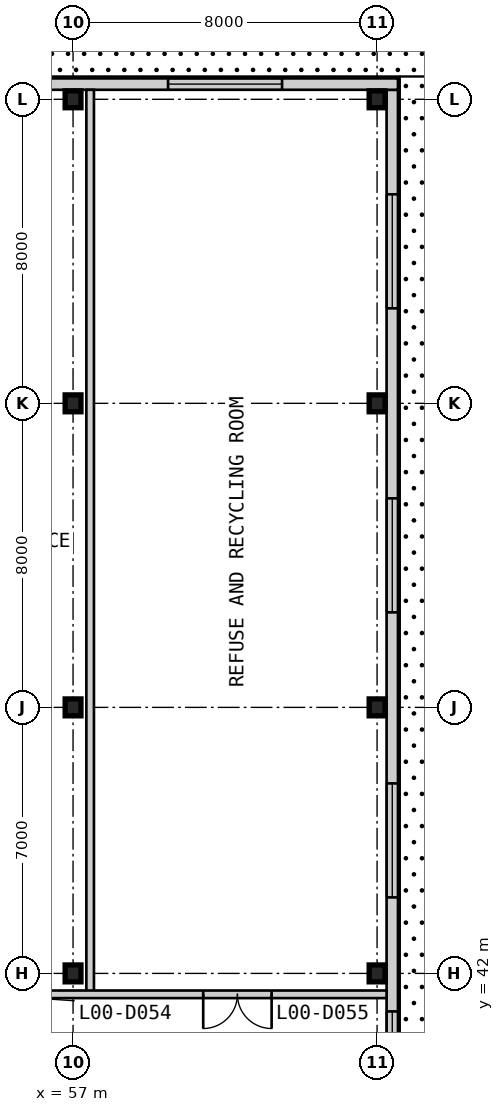
"""IFC4 building model, lengths in metres.
Left out: names, types, materials, properties, quantities, classifications, styles, units other than length and angle.
Written with IfcOpenShell. Run it as: python <this file> out.ifc"""

import sys

from ifc_helpers import new_model, si_unit, direction, frame, frame_2d, origin, origin_2d, place, context, subcontext, project, spatial, rectangle, i_section, extrude, element, fill, save


model = new_model("IFC4")
c1 = context("Model", 3, precision=1e-05, world=origin(), true_north=direction((0.0, 1.0)))
c2 = subcontext(c1, "Body", "Model", "MODEL_VIEW")
j1 = project(units=[si_unit("LENGTHUNIT", "METRE"), si_unit("PLANEANGLEUNIT", "RADIAN")], contexts=[c1])
p1 = place(None, origin())
s1 = spatial("IfcSite", under=j1, at=p1, CompositionType="ELEMENT")
p2 = place(p1, origin())
s2 = spatial("IfcBuilding", under=s1, at=p2, CompositionType="ELEMENT")
p3 = place(p2, origin())
s3 = spatial("IfcBuildingStorey", under=s2, at=p3, CompositionType="ELEMENT", Elevation=0.0)
for number, where, z_axis, x_axis in (
    (1, (57.0, 42.0, 0.0), (0.0, 0.0, 1.0), (1.0, 0.0, 0.0)),
    (2, (57.0, 49.0, 0.0), (0.0, 0.0, 1.0), (1.0, 0.0, 0.0)),
    (3, (57.0, 57.0, 0.0), (0.0, 0.0, 1.0), (1.0, 0.0, 0.0)),
):
    element("IfcColumn", number, at=place(p3, frame(where, z_axis=z_axis, x_axis=x_axis)), inside=s3, PredefinedType="COLUMN", context=c2, shape_type="SweptSolid", body=[
        extrude(i_section(OverallWidth=0.417, OverallDepth=0.445, WebThickness=0.039, FlangeThickness=0.063, at=origin_2d()), origin(), (0.0, 0.0, 1.0), 7.0),
    ])
for number, where, z_axis, x_axis in (
    (4, (57.0, 65.0, -0.3), (0.0, 0.0, 1.0), (1.0, 0.0, 0.0)),
    (5, (65.0, 42.0, -0.3), (0.0, 0.0, 1.0), (1.0, 0.0, 0.0)),
    (6, (65.0, 49.0, -0.3), (0.0, 0.0, 1.0), (1.0, 0.0, 0.0)),
    (7, (65.0, 57.0, -0.3), (0.0, 0.0, 1.0), (1.0, 0.0, 0.0)),
    (8, (65.0, 65.0, -0.3), (0.0, 0.0, 1.0), (1.0, 0.0, 0.0)),
):
    element("IfcColumn", number, at=place(p3, frame(where, z_axis=z_axis, x_axis=x_axis)), inside=s3, PredefinedType="COLUMN", context=c2, shape_type="SweptSolid", body=[
        extrude(i_section(OverallWidth=0.417, OverallDepth=0.445, WebThickness=0.039, FlangeThickness=0.063, at=origin_2d()), origin(), (0.0, 0.0, 1.0), 7.3),
    ])
p4 = place(p3, frame((65.4, -15.25, 0.0), z_axis=(0.0, 0.0, 1.0), x_axis=(0.0, 1.0, 0.0)))
e9 = element("IfcWall", 9, at=p4, inside=s3, PredefinedType="SOLIDWALL", context=c2, shape_type="SweptSolid", body=[
    extrude(rectangle(XDim=80.5, YDim=0.3, at=frame_2d((40.25, 0.0))), origin(), (0.0, 0.0, 1.0), 6.7),
])
p5 = place(p4, frame((33.35, 0.0, 0.0)))
e10 = element("IfcOpeningElement", 10, at=p5, cuts=e9, PredefinedType="OPENING", context=c2, shape_type="SweptSolid", body=[
    extrude(rectangle(XDim=1.8, YDim=2.4, at=frame_2d((0.9, 1.2))), frame((0.0, 0.16, 0.0), z_axis=(0.0, -1.0, 0.0), x_axis=(1.0, 0.0, 0.0)), (0.0, 0.0, 1.0), 0.32),
])
p6 = place(p4, frame((45.35, 0.0, 0.0)))
e11 = element("IfcOpeningElement", 11, at=p6, cuts=e9, PredefinedType="OPENING", context=c2, shape_type="SweptSolid", body=[
    extrude(rectangle(XDim=1.8, YDim=2.4, at=frame_2d((0.9, 1.2))), frame((0.0, 0.16, 0.0), z_axis=(0.0, -1.0, 0.0), x_axis=(1.0, 0.0, 0.0)), (0.0, 0.0, 1.0), 0.32),
])
p7 = place(p4, frame((2.75, 0.0, 0.9)))
e12 = element("IfcOpeningElement", 12, at=p7, cuts=e9, PredefinedType="OPENING", context=c2, shape_type="SweptSolid", body=[
    extrude(rectangle(XDim=3.0, YDim=2.4, at=frame_2d((1.5, 1.2))), frame((0.0, 0.16, 0.0), z_axis=(0.0, -1.0, 0.0), x_axis=(1.0, 0.0, 0.0)), (0.0, 0.0, 1.0), 0.32),
])
p8 = place(p4, frame((10.75, 0.0, 0.9)))
e13 = element("IfcOpeningElement", 13, at=p8, cuts=e9, PredefinedType="OPENING", context=c2, shape_type="SweptSolid", body=[
    extrude(rectangle(XDim=3.0, YDim=2.4, at=frame_2d((1.5, 1.2))), frame((0.0, 0.16, 0.0), z_axis=(0.0, -1.0, 0.0), x_axis=(1.0, 0.0, 0.0)), (0.0, 0.0, 1.0), 0.32),
])
p9 = place(p4, frame((18.75, 0.0, 0.9)))
e14 = element("IfcOpeningElement", 14, at=p9, cuts=e9, PredefinedType="OPENING", context=c2, shape_type="SweptSolid", body=[
    extrude(rectangle(XDim=3.0, YDim=2.4, at=frame_2d((1.5, 1.2))), frame((0.0, 0.16, 0.0), z_axis=(0.0, -1.0, 0.0), x_axis=(1.0, 0.0, 0.0)), (0.0, 0.0, 1.0), 0.32),
])
p10 = place(p4, frame((53.25, 0.0, 0.9)))
e15 = element("IfcOpeningElement", 15, at=p10, cuts=e9, PredefinedType="OPENING", context=c2, shape_type="SweptSolid", body=[
    extrude(rectangle(XDim=3.0, YDim=2.4, at=frame_2d((1.5, 1.2))), frame((0.0, 0.16, 0.0), z_axis=(0.0, -1.0, 0.0), x_axis=(1.0, 0.0, 0.0)), (0.0, 0.0, 1.0), 0.32),
])
p11 = place(p4, frame((59.25, 0.0, 0.9)))
e16 = element("IfcOpeningElement", 16, at=p11, cuts=e9, PredefinedType="OPENING", context=c2, shape_type="SweptSolid", body=[
    extrude(rectangle(XDim=3.0, YDim=2.4, at=frame_2d((1.5, 1.2))), frame((0.0, 0.16, 0.0), z_axis=(0.0, -1.0, 0.0), x_axis=(1.0, 0.0, 0.0)), (0.0, 0.0, 1.0), 0.32),
])
p12 = place(p4, frame((66.75, 0.0, 0.9)))
e17 = element("IfcOpeningElement", 17, at=p12, cuts=e9, PredefinedType="OPENING", context=c2, shape_type="SweptSolid", body=[
    extrude(rectangle(XDim=3.0, YDim=2.4, at=frame_2d((1.5, 1.2))), frame((0.0, 0.16, 0.0), z_axis=(0.0, -1.0, 0.0), x_axis=(1.0, 0.0, 0.0)), (0.0, 0.0, 1.0), 0.32),
])
p13 = place(p4, frame((74.75, 0.0, 0.9)))
e18 = element("IfcOpeningElement", 18, at=p13, cuts=e9, PredefinedType="OPENING", context=c2, shape_type="SweptSolid", body=[
    extrude(rectangle(XDim=3.0, YDim=2.4, at=frame_2d((1.5, 1.2))), frame((0.0, 0.16, 0.0), z_axis=(0.0, -1.0, 0.0), x_axis=(1.0, 0.0, 0.0)), (0.0, 0.0, 1.0), 0.32),
])
p14 = place(p3, frame((65.55, 65.4, 0.0), z_axis=(0.0, 0.0, 1.0), x_axis=(-1.0, 0.0, 0.0)))
e19 = element("IfcWall", 19, at=p14, inside=s3, PredefinedType="SOLIDWALL", context=c2, shape_type="SweptSolid", body=[
    extrude(rectangle(XDim=81.1, YDim=0.3, at=frame_2d((40.55, 0.0))), origin(), (0.0, 0.0, 1.0), 6.7),
])
p15 = place(p14, frame((37.65, 0.0, 0.0)))
e20 = element("IfcOpeningElement", 20, at=p15, cuts=e19, PredefinedType="OPENING", context=c2, shape_type="SweptSolid", body=[
    extrude(rectangle(XDim=1.8, YDim=2.4, at=frame_2d((0.9, 1.2))), frame((0.0, 0.16, 0.0), z_axis=(0.0, -1.0, 0.0), x_axis=(1.0, 0.0, 0.0)), (0.0, 0.0, 1.0), 0.32),
])
p16 = place(p14, frame((33.65, 0.0, 0.0)))
e21 = element("IfcOpeningElement", 21, at=p16, cuts=e19, PredefinedType="OPENING", context=c2, shape_type="SweptSolid", body=[
    extrude(rectangle(XDim=1.8, YDim=2.4, at=frame_2d((0.9, 1.2))), frame((0.0, 0.16, 0.0), z_axis=(0.0, -1.0, 0.0), x_axis=(1.0, 0.0, 0.0)), (0.0, 0.0, 1.0), 0.32),
])
p17 = place(p14, frame((18.25, 0.0, 0.0)))
e22 = element("IfcOpeningElement", 22, at=p17, cuts=e19, PredefinedType="OPENING", context=c2, shape_type="SweptSolid", body=[
    extrude(rectangle(XDim=3.6, YDim=4.5, at=frame_2d((1.8, 2.25))), frame((0.0, 0.16, 0.0), z_axis=(0.0, -1.0, 0.0), x_axis=(1.0, 0.0, 0.0)), (0.0, 0.0, 1.0), 0.32),
])
p18 = place(p14, frame((75.05, 0.0, 0.9)))
e23 = element("IfcOpeningElement", 23, at=p18, cuts=e19, PredefinedType="OPENING", context=c2, shape_type="SweptSolid", body=[
    extrude(rectangle(XDim=3.0, YDim=2.4, at=frame_2d((1.5, 1.2))), frame((0.0, 0.16, 0.0), z_axis=(0.0, -1.0, 0.0), x_axis=(1.0, 0.0, 0.0)), (0.0, 0.0, 1.0), 0.32),
])
p19 = place(p14, frame((67.05, 0.0, 0.9)))
e24 = element("IfcOpeningElement", 24, at=p19, cuts=e19, PredefinedType="OPENING", context=c2, shape_type="SweptSolid", body=[
    extrude(rectangle(XDim=3.0, YDim=2.4, at=frame_2d((1.5, 1.2))), frame((0.0, 0.16, 0.0), z_axis=(0.0, -1.0, 0.0), x_axis=(1.0, 0.0, 0.0)), (0.0, 0.0, 1.0), 0.32),
])
p20 = place(p14, frame((59.05, 0.0, 0.9)))
e25 = element("IfcOpeningElement", 25, at=p20, cuts=e19, PredefinedType="OPENING", context=c2, shape_type="SweptSolid", body=[
    extrude(rectangle(XDim=3.0, YDim=2.4, at=frame_2d((1.5, 1.2))), frame((0.0, 0.16, 0.0), z_axis=(0.0, -1.0, 0.0), x_axis=(1.0, 0.0, 0.0)), (0.0, 0.0, 1.0), 0.32),
])
p21 = place(p14, frame((45.05, 0.0, 0.9)))
e26 = element("IfcOpeningElement", 26, at=p21, cuts=e19, PredefinedType="OPENING", context=c2, shape_type="SweptSolid", body=[
    extrude(rectangle(XDim=3.0, YDim=2.4, at=frame_2d((1.5, 1.2))), frame((0.0, 0.16, 0.0), z_axis=(0.0, -1.0, 0.0), x_axis=(1.0, 0.0, 0.0)), (0.0, 0.0, 1.0), 0.32),
])
p22 = place(p14, frame((24.55, 0.0, 0.9)))
e27 = element("IfcOpeningElement", 27, at=p22, cuts=e19, PredefinedType="OPENING", context=c2, shape_type="SweptSolid", body=[
    extrude(rectangle(XDim=3.0, YDim=2.4, at=frame_2d((1.5, 1.2))), frame((0.0, 0.16, 0.0), z_axis=(0.0, -1.0, 0.0), x_axis=(1.0, 0.0, 0.0)), (0.0, 0.0, 1.0), 0.32),
])
p23 = place(p14, frame((11.05, 0.0, 0.9)))
e28 = element("IfcOpeningElement", 28, at=p23, cuts=e19, PredefinedType="OPENING", context=c2, shape_type="SweptSolid", body=[
    extrude(rectangle(XDim=3.0, YDim=2.4, at=frame_2d((1.5, 1.2))), frame((0.0, 0.16, 0.0), z_axis=(0.0, -1.0, 0.0), x_axis=(1.0, 0.0, 0.0)), (0.0, 0.0, 1.0), 0.32),
])
p24 = place(p14, frame((3.05, 0.0, 0.9)))
e29 = element("IfcOpeningElement", 29, at=p24, cuts=e19, PredefinedType="OPENING", context=c2, shape_type="SweptSolid", body=[
    extrude(rectangle(XDim=3.0, YDim=2.4, at=frame_2d((1.5, 1.2))), frame((0.0, 0.16, 0.0), z_axis=(0.0, -1.0, 0.0), x_axis=(1.0, 0.0, 0.0)), (0.0, 0.0, 1.0), 0.32),
])
p25 = place(p3, frame((57.45, 41.45, 0.0), z_axis=(0.0, 0.0, 1.0), x_axis=(0.0, 1.0, 0.0)))
e30 = element("IfcWall", 30, at=p25, inside=s3, PredefinedType="PARTITIONING", context=c2, shape_type="SweptSolid", body=[
    extrude(rectangle(XDim=23.8, YDim=0.2, at=frame_2d((11.9, 0.0))), origin(), (0.0, 0.0, 1.0), 6.7),
])
p26 = place(p3, frame((50.6, 41.45, 0.0), z_axis=(0.0, 0.0, 1.0), x_axis=(1.0, 0.0, 0.0)))
e31 = element("IfcWall", 31, at=p26, inside=s3, PredefinedType="PARTITIONING", context=c2, shape_type="SweptSolid", body=[
    extrude(rectangle(XDim=14.65, YDim=0.2, at=frame_2d((7.325, 0.0))), origin(), (0.0, 0.0, 1.0), 6.7),
])
p27 = place(p26, frame((2.55, 0.0, 0.0)))
e32 = element("IfcOpeningElement", 32, at=p27, cuts=e31, PredefinedType="OPENING", context=c2, shape_type="SweptSolid", body=[
    extrude(rectangle(XDim=1.8, YDim=2.4, at=frame_2d((0.9, 1.2))), frame((0.0, 0.11, 0.0), z_axis=(0.0, -1.0, 0.0), x_axis=(1.0, 0.0, 0.0)), (0.0, 0.0, 1.0), 0.22),
])
p28 = place(p26, frame((9.825, 0.0, 0.0)))
e33 = element("IfcOpeningElement", 33, at=p28, cuts=e31, PredefinedType="OPENING", context=c2, shape_type="SweptSolid", body=[
    extrude(rectangle(XDim=1.8, YDim=2.4, at=frame_2d((0.9, 1.2))), frame((0.0, 0.11, 0.0), z_axis=(0.0, -1.0, 0.0), x_axis=(1.0, 0.0, 0.0)), (0.0, 0.0, 1.0), 0.22),
])
p29 = place(p10, origin())
e34 = element("IfcWindow", 34, at=p29, inside=s3, PartitioningType="SINGLE_PANEL", PredefinedType="WINDOW", context=c2, shape_type="SweptSolid", body=[
    extrude(rectangle(XDim=3.0, YDim=2.4, at=frame_2d((1.5, 1.2))), frame((0.0, 0.03, 0.0), z_axis=(0.0, -1.0, 0.0), x_axis=(1.0, 0.0, 0.0)), (0.0, 0.0, 1.0), 0.06),
])
fill(e15, e34)
p30 = place(p11, origin())
e35 = element("IfcWindow", 35, at=p30, inside=s3, PartitioningType="SINGLE_PANEL", PredefinedType="WINDOW", context=c2, shape_type="SweptSolid", body=[
    extrude(rectangle(XDim=3.0, YDim=2.4, at=frame_2d((1.5, 1.2))), frame((0.0, 0.03, 0.0), z_axis=(0.0, -1.0, 0.0), x_axis=(1.0, 0.0, 0.0)), (0.0, 0.0, 1.0), 0.06),
])
fill(e16, e35)
p31 = place(p12, origin())
e36 = element("IfcWindow", 36, at=p31, inside=s3, PartitioningType="SINGLE_PANEL", PredefinedType="WINDOW", context=c2, shape_type="SweptSolid", body=[
    extrude(rectangle(XDim=3.0, YDim=2.4, at=frame_2d((1.5, 1.2))), frame((0.0, 0.03, 0.0), z_axis=(0.0, -1.0, 0.0), x_axis=(1.0, 0.0, 0.0)), (0.0, 0.0, 1.0), 0.06),
])
fill(e17, e36)
p32 = place(p13, origin())
e37 = element("IfcWindow", 37, at=p32, inside=s3, PartitioningType="SINGLE_PANEL", PredefinedType="WINDOW", context=c2, shape_type="SweptSolid", body=[
    extrude(rectangle(XDim=3.0, YDim=2.4, at=frame_2d((1.5, 1.2))), frame((0.0, 0.03, 0.0), z_axis=(0.0, -1.0, 0.0), x_axis=(1.0, 0.0, 0.0)), (0.0, 0.0, 1.0), 0.06),
])
fill(e18, e37)
p33 = place(p24, origin())
e38 = element("IfcWindow", 38, at=p33, inside=s3, PartitioningType="SINGLE_PANEL", PredefinedType="WINDOW", context=c2, shape_type="SweptSolid", body=[
    extrude(rectangle(XDim=3.0, YDim=2.4, at=frame_2d((1.5, 1.2))), frame((0.0, 0.03, 0.0), z_axis=(0.0, -1.0, 0.0), x_axis=(1.0, 0.0, 0.0)), (0.0, 0.0, 1.0), 0.06),
])
fill(e29, e38)
p34 = place(p28, frame((1.8, 0.0, 0.0), z_axis=(0.0, 0.0, 1.0), x_axis=(-1.0, 0.0, 0.0)))
e39 = element("IfcDoor", 39, at=p34, inside=s3, OperationType="DOUBLE_DOOR_SINGLE_SWING", PredefinedType="DOOR", context=c2, shape_type="SweptSolid", body=[
    extrude(rectangle(XDim=1.8, YDim=2.4, at=frame_2d((0.9, 1.2))), frame((0.0, 0.025, 0.0), z_axis=(0.0, -1.0, 0.0), x_axis=(1.0, 0.0, 0.0)), (0.0, 0.0, 1.0), 0.05),
])
fill(e33, e39)
save(model, sys.argv[1])
